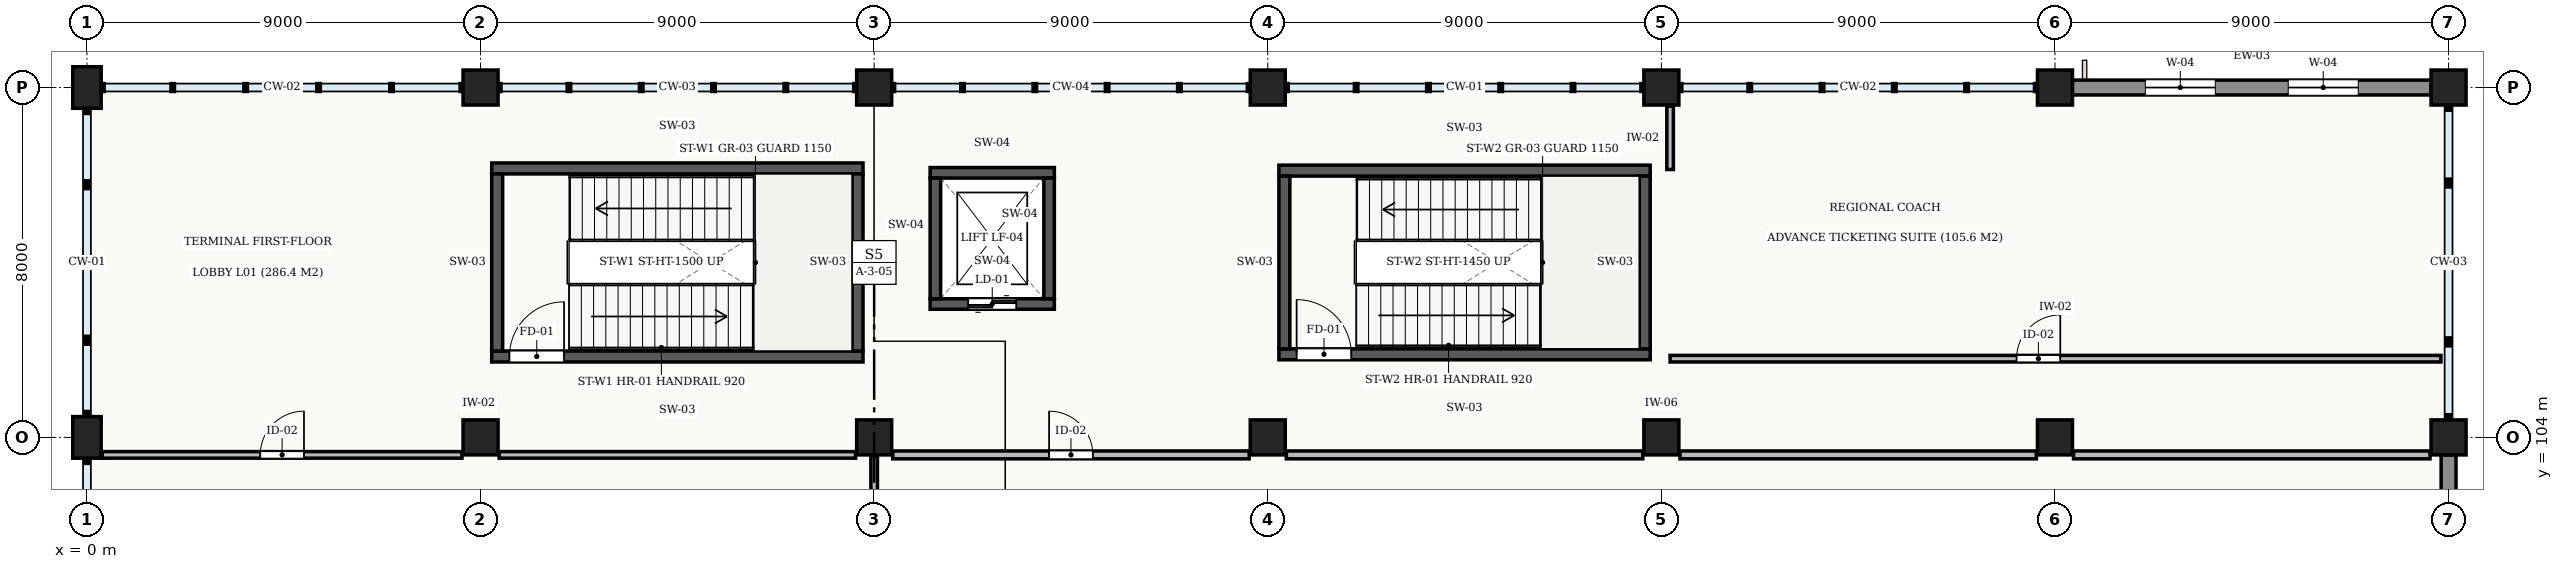
"""IFC4 building model, lengths in metres.
Left out: names, types, materials, properties, quantities, classifications, styles, units other than length and angle.
Written with IfcOpenShell. Run it as: python <this file> out.ifc"""

import sys

from ifc_helpers import new_model, si_unit, direction, frame, frame_2d, origin, origin_2d, place, context, subcontext, project, spatial, rectangle, extrude, element, fill, save


model = new_model("IFC4")
c1 = context("Model", 3, precision=1e-05, world=origin(), true_north=direction((0.0, 1.0)))
c2 = subcontext(c1, "Body", "Model", "MODEL_VIEW")
j1 = project(units=[si_unit("LENGTHUNIT", "METRE"), si_unit("PLANEANGLEUNIT", "RADIAN")], contexts=[c1])
p1 = place(None, origin())
s1 = spatial("IfcSite", under=j1, at=p1, CompositionType="ELEMENT")
p2 = place(p1, origin())
s2 = spatial("IfcBuilding", under=s1, at=p2, CompositionType="ELEMENT")
p3 = place(p2, frame((0.0, 0.0, 5.4)))
s3 = spatial("IfcBuildingStorey", under=s2, at=p3, CompositionType="ELEMENT", Elevation=5.4)
for number, where, z_axis, x_axis in (
    (1, (0.0, 104.0, 0.0), (0.0, 0.0, 1.0), (1.0, 0.0, 0.0)),
    (2, (0.0, 112.0, 0.0), (0.0, 0.0, 1.0), (1.0, 0.0, 0.0)),
):
    element("IfcColumn", number, at=place(p3, frame(where, z_axis=z_axis, x_axis=x_axis)), inside=s3, PredefinedType="COLUMN", context=c2, shape_type="SweptSolid", body=[
        extrude(rectangle(XDim=0.65, YDim=0.95, at=origin_2d()), origin(), (0.0, 0.0, 1.0), 4.8),
    ])
for number, where, z_axis, x_axis in (
    (3, (9.0, 104.0, 0.0), (0.0, 0.0, 1.0), (1.0, 0.0, 0.0)),
    (4, (9.0, 112.0, 0.0), (0.0, 0.0, 1.0), (1.0, 0.0, 0.0)),
    (5, (18.0, 104.0, 0.0), (0.0, 0.0, 1.0), (1.0, 0.0, 0.0)),
    (6, (18.0, 112.0, 0.0), (0.0, 0.0, 1.0), (1.0, 0.0, 0.0)),
    (7, (27.0, 104.0, 0.0), (0.0, 0.0, 1.0), (1.0, 0.0, 0.0)),
    (8, (27.0, 112.0, 0.0), (0.0, 0.0, 1.0), (1.0, 0.0, 0.0)),
    (9, (36.0, 104.0, 0.0), (0.0, 0.0, 1.0), (1.0, 0.0, 0.0)),
    (10, (36.0, 112.0, 0.0), (0.0, 0.0, 1.0), (1.0, 0.0, 0.0)),
    (11, (45.0, 104.0, 0.0), (0.0, 0.0, 1.0), (1.0, 0.0, 0.0)),
    (12, (45.0, 112.0, 0.0), (0.0, 0.0, 1.0), (1.0, 0.0, 0.0)),
    (13, (54.0, 104.0, 0.0), (0.0, 0.0, 1.0), (1.0, 0.0, 0.0)),
    (14, (54.0, 112.0, 0.0), (0.0, 0.0, 1.0), (1.0, 0.0, 0.0)),
):
    element("IfcColumn", number, at=place(p3, frame(where, z_axis=z_axis, x_axis=x_axis)), inside=s3, PredefinedType="COLUMN", context=c2, shape_type="SweptSolid", body=[
        extrude(rectangle(XDim=0.8, YDim=0.8, at=origin_2d()), origin(), (0.0, 0.0, 1.0), 4.8),
    ])
p4 = place(p3, frame((45.398, 112.0, 0.0), z_axis=(0.0, 0.0, 1.0), x_axis=(1.0, 0.0, 0.0)))
e15 = element("IfcWall", 15, at=p4, inside=s3, PredefinedType="STANDARD", context=c2, shape_type="SweptSolid", body=[
    extrude(rectangle(XDim=8.204, YDim=0.34, at=frame_2d((4.102, 0.0))), origin(), (0.0, 0.0, 1.0), 3.86),
])
p5 = place(p4, frame((1.668, 0.0, 0.9)))
e16 = element("IfcOpeningElement", 16, at=p5, cuts=e15, PredefinedType="OPENING", context=c2, shape_type="SweptSolid", body=[
    extrude(rectangle(XDim=1.6, YDim=2.2, at=frame_2d((0.8, 1.1))), frame((0.0, 0.182, 0.0), z_axis=(0.0, -1.0, 0.0), x_axis=(1.0, 0.0, 0.0)), (0.0, 0.0, 1.0), 0.364),
])
p6 = place(p4, frame((4.936, 0.0, 0.9)))
e17 = element("IfcOpeningElement", 17, at=p6, cuts=e15, PredefinedType="OPENING", context=c2, shape_type="SweptSolid", body=[
    extrude(rectangle(XDim=1.6, YDim=2.2, at=frame_2d((0.8, 1.1))), frame((0.0, 0.182, 0.0), z_axis=(0.0, -1.0, 0.0), x_axis=(1.0, 0.0, 0.0)), (0.0, 0.0, 1.0), 0.364),
])
p7 = place(p3, frame((54.0, 103.602, 0.0), z_axis=(0.0, 0.0, 1.0), x_axis=(0.0, -1.0, 0.0)))
e18 = element("IfcWall", 18, at=p7, inside=s3, PredefinedType="STANDARD", context=c2, shape_type="SweptSolid", body=[
    extrude(rectangle(XDim=7.204, YDim=0.34, at=frame_2d((3.602, 0.0))), origin(), (0.0, 0.0, 1.0), 3.86),
])
p8 = place(p7, frame((0.801, 0.0, 0.9)))
e19 = element("IfcOpeningElement", 19, at=p8, cuts=e18, PredefinedType="OPENING", context=c2, shape_type="SweptSolid", body=[
    extrude(rectangle(XDim=2.4, YDim=1.35, at=frame_2d((1.2, 0.675))), frame((0.0, 0.182, 0.0), z_axis=(0.0, -1.0, 0.0), x_axis=(1.0, 0.0, 0.0)), (0.0, 0.0, 1.0), 0.364),
])
p9 = place(p7, frame((4.003, 0.0, 0.9)))
e20 = element("IfcOpeningElement", 20, at=p9, cuts=e18, PredefinedType="OPENING", context=c2, shape_type="SweptSolid", body=[
    extrude(rectangle(XDim=2.4, YDim=1.35, at=frame_2d((1.2, 0.675))), frame((0.0, 0.182, 0.0), z_axis=(0.0, -1.0, 0.0), x_axis=(1.0, 0.0, 0.0)), (0.0, 0.0, 1.0), 0.364),
])
p10 = place(p3, frame((9.255, 105.85, 0.0), z_axis=(0.0, 0.0, 1.0), x_axis=(1.0, 0.0, 0.0)))
e21 = element("IfcWall", 21, at=p10, inside=s3, PredefinedType="SHEAR", context=c2, shape_type="SweptSolid", body=[
    extrude(rectangle(XDim=8.49, YDim=0.25, at=frame_2d((4.245, 0.0))), origin(), (0.0, 0.0, 1.0), 4.48),
])
p11 = place(p10, frame((0.405, 0.0, 0.0)))
e22 = element("IfcOpeningElement", 22, at=p11, cuts=e21, PredefinedType="OPENING", context=c2, shape_type="SweptSolid", body=[
    extrude(rectangle(XDim=1.25, YDim=2.15, at=frame_2d((0.625, 1.075))), frame((0.0, 0.137, 0.0), z_axis=(0.0, -1.0, 0.0), x_axis=(1.0, 0.0, 0.0)), (0.0, 0.0, 1.0), 0.274),
])
p12 = place(p3, frame((17.745, 110.15, 0.0), z_axis=(0.0, 0.0, 1.0), x_axis=(-1.0, 0.0, 0.0)))
e23 = element("IfcWall", 23, at=p12, inside=s3, PredefinedType="SHEAR", context=c2, shape_type="SweptSolid", body=[
    extrude(rectangle(XDim=8.49, YDim=0.25, at=frame_2d((4.245, 0.0))), origin(), (0.0, 0.0, 1.0), 4.48),
])
for number, where, z_axis, x_axis in (
    (24, (9.38, 110.025, 0.0), (0.0, 0.0, 1.0), (0.0, -1.0, 0.0)),
    (25, (17.62, 105.975, 0.0), (0.0, 0.0, 1.0), (0.0, 1.0, 0.0)),
):
    element("IfcWall", number, at=place(p3, frame(where, z_axis=z_axis, x_axis=x_axis)), inside=s3, PredefinedType="SHEAR", context=c2, shape_type="SweptSolid", body=[
        extrude(rectangle(XDim=4.05, YDim=0.25, at=frame_2d((2.025, 0.0))), origin(), (0.0, 0.0, 1.0), 4.48),
    ])
p13 = place(p3, frame((27.255, 105.9, 0.0), z_axis=(0.0, 0.0, 1.0), x_axis=(1.0, 0.0, 0.0)))
e26 = element("IfcWall", 26, at=p13, inside=s3, PredefinedType="SHEAR", context=c2, shape_type="SweptSolid", body=[
    extrude(rectangle(XDim=8.49, YDim=0.25, at=frame_2d((4.245, 0.0))), origin(), (0.0, 0.0, 1.0), 4.48),
])
p14 = place(p13, frame((0.405, 0.0, 0.0)))
e27 = element("IfcOpeningElement", 27, at=p14, cuts=e26, PredefinedType="OPENING", context=c2, shape_type="SweptSolid", body=[
    extrude(rectangle(XDim=1.25, YDim=2.15, at=frame_2d((0.625, 1.075))), frame((0.0, 0.137, 0.0), z_axis=(0.0, -1.0, 0.0), x_axis=(1.0, 0.0, 0.0)), (0.0, 0.0, 1.0), 0.274),
])
p15 = place(p3, frame((35.745, 110.1, 0.0), z_axis=(0.0, 0.0, 1.0), x_axis=(-1.0, 0.0, 0.0)))
e28 = element("IfcWall", 28, at=p15, inside=s3, PredefinedType="SHEAR", context=c2, shape_type="SweptSolid", body=[
    extrude(rectangle(XDim=8.49, YDim=0.25, at=frame_2d((4.245, 0.0))), origin(), (0.0, 0.0, 1.0), 4.48),
])
for number, where, z_axis, x_axis in (
    (29, (27.38, 109.975, 0.0), (0.0, 0.0, 1.0), (0.0, -1.0, 0.0)),
    (30, (35.62, 106.025, 0.0), (0.0, 0.0, 1.0), (0.0, 1.0, 0.0)),
):
    element("IfcWall", number, at=place(p3, frame(where, z_axis=z_axis, x_axis=x_axis)), inside=s3, PredefinedType="SHEAR", context=c2, shape_type="SweptSolid", body=[
        extrude(rectangle(XDim=3.95, YDim=0.25, at=frame_2d((1.975, 0.0))), origin(), (0.0, 0.0, 1.0), 4.48),
    ])
p16 = place(p3, frame((19.28, 107.05, 0.0), z_axis=(0.0, 0.0, 1.0), x_axis=(1.0, 0.0, 0.0)))
e31 = element("IfcWall", 31, at=p16, inside=s3, PredefinedType="SHEAR", context=c2, shape_type="SweptSolid", body=[
    extrude(rectangle(XDim=2.84, YDim=0.24, at=frame_2d((1.42, 0.0))), origin(), (0.0, 0.0, 1.0), 4.48),
])
p17 = place(p16, frame((0.87, 0.0, 0.0)))
e32 = element("IfcOpeningElement", 32, at=p17, cuts=e31, PredefinedType="OPENING", context=c2, shape_type="SweptSolid", body=[
    extrude(rectangle(XDim=1.1, YDim=2.2, at=frame_2d((0.55, 1.1))), frame((0.0, 0.132, 0.0), z_axis=(0.0, -1.0, 0.0), x_axis=(1.0, 0.0, 0.0)), (0.0, 0.0, 1.0), 0.264),
])
p18 = place(p3, frame((22.12, 110.05, 0.0), z_axis=(0.0, 0.0, 1.0), x_axis=(-1.0, 0.0, 0.0)))
e33 = element("IfcWall", 33, at=p18, inside=s3, PredefinedType="SHEAR", context=c2, shape_type="SweptSolid", body=[
    extrude(rectangle(XDim=2.84, YDim=0.24, at=frame_2d((1.42, 0.0))), origin(), (0.0, 0.0, 1.0), 4.48),
])
for number, where, z_axis, x_axis in (
    (34, (19.4, 109.93, 0.0), (0.0, 0.0, 1.0), (0.0, -1.0, 0.0)),
    (35, (22.0, 107.17, 0.0), (0.0, 0.0, 1.0), (0.0, 1.0, 0.0)),
):
    element("IfcWall", number, at=place(p3, frame(where, z_axis=z_axis, x_axis=x_axis)), inside=s3, PredefinedType="SHEAR", context=c2, shape_type="SweptSolid", body=[
        extrude(rectangle(XDim=2.76, YDim=0.24, at=frame_2d((1.38, 0.0))), origin(), (0.0, 0.0, 1.0), 4.48),
    ])
p19 = place(p3, frame((0.35, 103.6, 0.0), z_axis=(0.0, 0.0, 1.0), x_axis=(1.0, 0.0, 0.0)))
e36 = element("IfcWall", 36, at=p19, inside=s3, PredefinedType="STANDARD", context=c2, shape_type="SweptSolid", body=[
    extrude(rectangle(XDim=8.225, YDim=0.15, at=frame_2d((4.112, 0.0))), origin(), (0.0, 0.0, 1.0), 4.48),
])
p20 = place(p19, frame((3.613, 0.0, 0.0)))
e37 = element("IfcOpeningElement", 37, at=p20, cuts=e36, PredefinedType="OPENING", context=c2, shape_type="SweptSolid", body=[
    extrude(rectangle(XDim=1.0, YDim=2.1, at=frame_2d((0.5, 1.05))), frame((0.0, 0.087, 0.0), z_axis=(0.0, -1.0, 0.0), x_axis=(1.0, 0.0, 0.0)), (0.0, 0.0, 1.0), 0.174),
])
p21 = place(p3, frame((9.425, 103.6, 0.0), z_axis=(0.0, 0.0, 1.0), x_axis=(1.0, 0.0, 0.0)))
e38 = element("IfcWall", 38, at=p21, inside=s3, PredefinedType="STANDARD", context=c2, shape_type="SweptSolid", body=[
    extrude(rectangle(XDim=8.15, YDim=0.15, at=frame_2d((4.075, 0.0))), origin(), (0.0, 0.0, 1.0), 4.48),
])
p22 = place(p3, frame((18.0, 96.425, 0.0), z_axis=(0.0, 0.0, 1.0), x_axis=(0.0, 1.0, 0.0)))
e39 = element("IfcWall", 39, at=p22, inside=s3, PredefinedType="STANDARD", context=c2, shape_type="SweptSolid", body=[
    extrude(rectangle(XDim=7.15, YDim=0.15, at=frame_2d((3.575, 0.0))), origin(), (0.0, 0.0, 1.0), 3.86),
])
p23 = place(p3, frame((18.425, 103.6, 0.0), z_axis=(0.0, 0.0, 1.0), x_axis=(1.0, 0.0, 0.0)))
e40 = element("IfcWall", 40, at=p23, inside=s3, PredefinedType="STANDARD", context=c2, shape_type="SweptSolid", body=[
    extrude(rectangle(XDim=8.15, YDim=0.18, at=frame_2d((4.075, 0.0))), origin(), (0.0, 0.0, 1.0), 4.48),
])
p24 = place(p23, frame((3.575, 0.0, 0.0)))
e41 = element("IfcOpeningElement", 41, at=p24, cuts=e40, PredefinedType="OPENING", context=c2, shape_type="SweptSolid", body=[
    extrude(rectangle(XDim=1.0, YDim=2.1, at=frame_2d((0.5, 1.05))), frame((0.0, 0.102, 0.0), z_axis=(0.0, -1.0, 0.0), x_axis=(1.0, 0.0, 0.0)), (0.0, 0.0, 1.0), 0.204),
])
for number, where, z_axis, x_axis in (
    (42, (27.425, 103.6, 0.0), (0.0, 0.0, 1.0), (1.0, 0.0, 0.0)),
    (43, (36.425, 103.6, 0.0), (0.0, 0.0, 1.0), (1.0, 0.0, 0.0)),
    (44, (45.425, 103.6, 0.0), (0.0, 0.0, 1.0), (1.0, 0.0, 0.0)),
):
    element("IfcWall", number, at=place(p3, frame(where, z_axis=z_axis, x_axis=x_axis)), inside=s3, PredefinedType="STANDARD", context=c2, shape_type="SweptSolid", body=[
        extrude(rectangle(XDim=8.15, YDim=0.18, at=frame_2d((4.075, 0.0))), origin(), (0.0, 0.0, 1.0), 4.48),
    ])
p25 = place(p3, frame((36.2, 105.8, 0.0), z_axis=(0.0, 0.0, 1.0), x_axis=(1.0, 0.0, 0.0)))
e45 = element("IfcWall", 45, at=p25, inside=s3, PredefinedType="STANDARD", context=c2, shape_type="SweptSolid", body=[
    extrude(rectangle(XDim=17.625, YDim=0.15, at=frame_2d((8.812, 0.0))), origin(), (0.0, 0.0, 1.0), 4.48),
])
p26 = place(p25, frame((7.921, 0.0, 0.0)))
e46 = element("IfcOpeningElement", 46, at=p26, cuts=e45, PredefinedType="OPENING", context=c2, shape_type="SweptSolid", body=[
    extrude(rectangle(XDim=1.0, YDim=2.1, at=frame_2d((0.5, 1.05))), frame((0.0, 0.087, 0.0), z_axis=(0.0, -1.0, 0.0), x_axis=(1.0, 0.0, 0.0)), (0.0, 0.0, 1.0), 0.174),
])
p27 = place(p3, frame((36.2, 110.125, 0.0), z_axis=(0.0, 0.0, 1.0), x_axis=(0.0, 1.0, 0.0)))
e47 = element("IfcWall", 47, at=p27, inside=s3, PredefinedType="STANDARD", context=c2, shape_type="SweptSolid", body=[
    extrude(rectangle(XDim=1.45, YDim=0.15, at=frame_2d((0.725, 0.0))), origin(), (0.0, 0.0, 1.0), 3.86),
])
p28 = place(p5, origin())
e48 = element("IfcWindow", 48, at=p28, inside=s3, PartitioningType="SINGLE_PANEL", PredefinedType="WINDOW", context=c2, shape_type="SweptSolid", body=[
    extrude(rectangle(XDim=1.6, YDim=2.2, at=frame_2d((0.8, 1.1))), frame((0.0, 0.03, 0.0), z_axis=(0.0, -1.0, 0.0), x_axis=(1.0, 0.0, 0.0)), (0.0, 0.0, 1.0), 0.06),
])
fill(e16, e48)
p29 = place(p6, origin())
e49 = element("IfcWindow", 49, at=p29, inside=s3, PartitioningType="SINGLE_PANEL", PredefinedType="WINDOW", context=c2, shape_type="SweptSolid", body=[
    extrude(rectangle(XDim=1.6, YDim=2.2, at=frame_2d((0.8, 1.1))), frame((0.0, 0.03, 0.0), z_axis=(0.0, -1.0, 0.0), x_axis=(1.0, 0.0, 0.0)), (0.0, 0.0, 1.0), 0.06),
])
fill(e17, e49)
p30 = place(p8, origin())
e50 = element("IfcWindow", 50, at=p30, inside=s3, PartitioningType="SINGLE_PANEL", PredefinedType="WINDOW", context=c2, shape_type="SweptSolid", body=[
    extrude(rectangle(XDim=2.4, YDim=1.35, at=frame_2d((1.2, 0.675))), frame((0.0, 0.03, 0.0), z_axis=(0.0, -1.0, 0.0), x_axis=(1.0, 0.0, 0.0)), (0.0, 0.0, 1.0), 0.06),
])
fill(e19, e50)
p31 = place(p11, origin())
e51 = element("IfcDoor", 51, at=p31, inside=s3, OperationType="SINGLE_SWING_RIGHT", PredefinedType="DOOR", context=c2, shape_type="SweptSolid", body=[
    extrude(rectangle(XDim=1.25, YDim=2.15, at=frame_2d((0.625, 1.075))), frame((0.0, 0.025, 0.0), z_axis=(0.0, -1.0, 0.0), x_axis=(1.0, 0.0, 0.0)), (0.0, 0.0, 1.0), 0.05),
])
fill(e22, e51)
p32 = place(p14, origin())
e52 = element("IfcDoor", 52, at=p32, inside=s3, OperationType="SINGLE_SWING_LEFT", PredefinedType="DOOR", context=c2, shape_type="SweptSolid", body=[
    extrude(rectangle(XDim=1.25, YDim=2.15, at=frame_2d((0.625, 1.075))), frame((0.0, 0.025, 0.0), z_axis=(0.0, -1.0, 0.0), x_axis=(1.0, 0.0, 0.0)), (0.0, 0.0, 1.0), 0.05),
])
fill(e27, e52)
p33 = place(p17, origin())
e53 = element("IfcDoor", 53, at=p33, inside=s3, OperationType="DOUBLE_DOOR_SLIDING", PredefinedType="DOOR", context=c2, shape_type="SweptSolid", body=[
    extrude(rectangle(XDim=1.1, YDim=2.2, at=frame_2d((0.55, 1.1))), frame((0.0, 0.025, 0.0), z_axis=(0.0, -1.0, 0.0), x_axis=(1.0, 0.0, 0.0)), (0.0, 0.0, 1.0), 0.05),
])
fill(e32, e53)
p34 = place(p20, origin())
e54 = element("IfcDoor", 54, at=p34, inside=s3, OperationType="SINGLE_SWING_RIGHT", PredefinedType="DOOR", context=c2, shape_type="SweptSolid", body=[
    extrude(rectangle(XDim=1.0, YDim=2.1, at=frame_2d((0.5, 1.05))), frame((0.0, 0.025, 0.0), z_axis=(0.0, -1.0, 0.0), x_axis=(1.0, 0.0, 0.0)), (0.0, 0.0, 1.0), 0.05),
])
fill(e37, e54)
p35 = place(p24, origin())
e55 = element("IfcDoor", 55, at=p35, inside=s3, OperationType="SINGLE_SWING_LEFT", PredefinedType="DOOR", context=c2, shape_type="SweptSolid", body=[
    extrude(rectangle(XDim=1.0, YDim=2.1, at=frame_2d((0.5, 1.05))), frame((0.0, 0.025, 0.0), z_axis=(0.0, -1.0, 0.0), x_axis=(1.0, 0.0, 0.0)), (0.0, 0.0, 1.0), 0.05),
])
fill(e41, e55)
p36 = place(p26, origin())
e56 = element("IfcDoor", 56, at=p36, inside=s3, OperationType="SINGLE_SWING_RIGHT", PredefinedType="DOOR", context=c2, shape_type="SweptSolid", body=[
    extrude(rectangle(XDim=1.0, YDim=2.1, at=frame_2d((0.5, 1.05))), frame((0.0, 0.025, 0.0), z_axis=(0.0, -1.0, 0.0), x_axis=(1.0, 0.0, 0.0)), (0.0, 0.0, 1.0), 0.05),
])
fill(e46, e56)
save(model, sys.argv[1])
